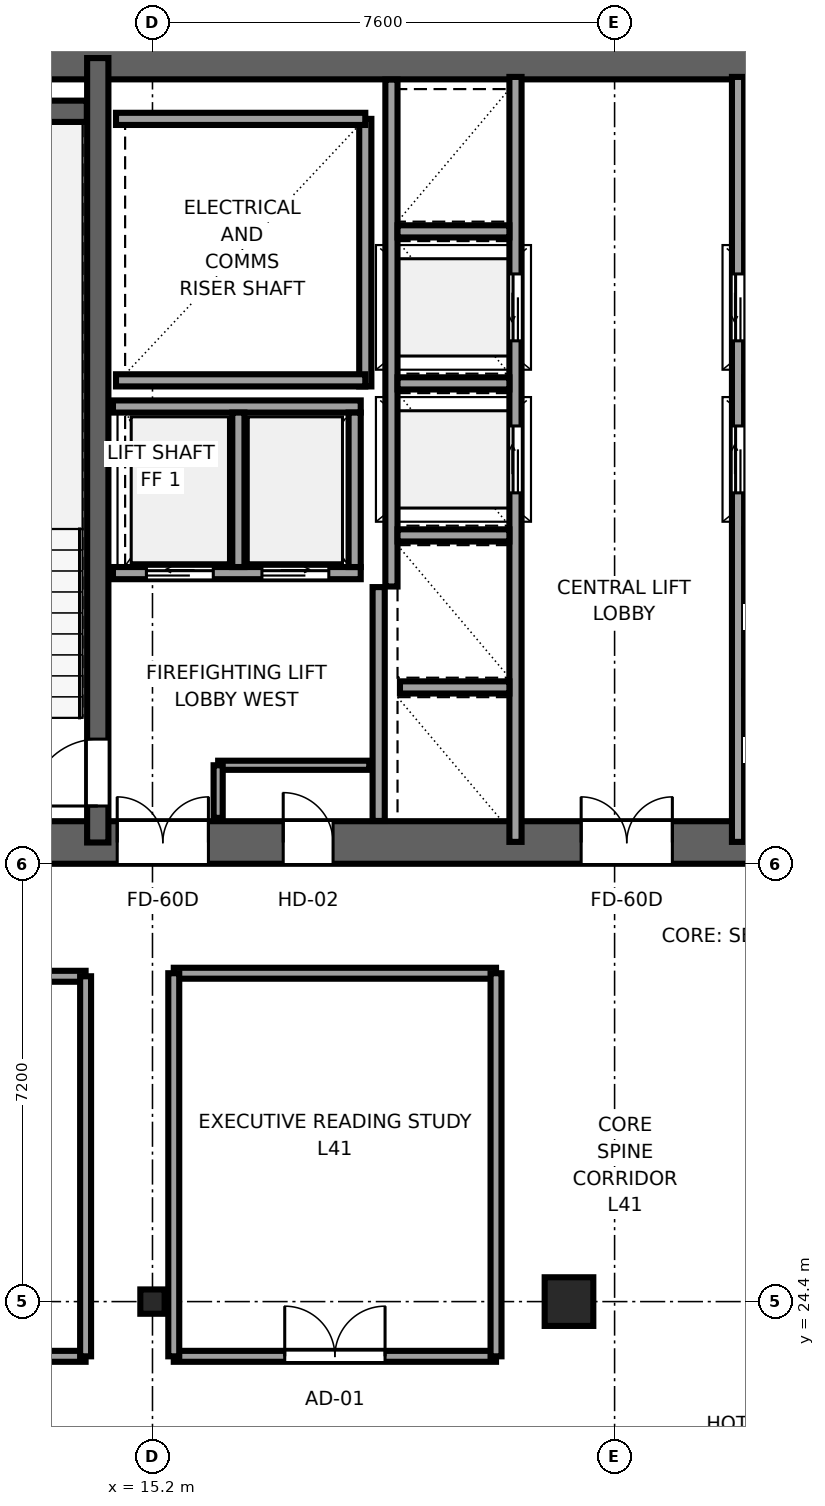
"""IFC4 building model, lengths in metres.
Left out: names, types, materials, properties, quantities, classifications, styles, units other than length and angle.
Written with IfcOpenShell. Run it as: python <this file> out.ifc"""

import sys

from ifc_helpers import new_model, si_unit, direction, frame, frame_2d, origin, origin_2d, place, context, subcontext, project, spatial, rectangle, i_section, extrude, source, transform, mapped, element, fill, save


model = new_model("IFC4")
c1 = context("Model", 3, precision=1e-05, world=origin(), true_north=direction((0.0, 1.0)))
c2 = subcontext(c1, "Body", "Model", "MODEL_VIEW")
j1 = project(units=[si_unit("LENGTHUNIT", "METRE"), si_unit("PLANEANGLEUNIT", "RADIAN")], contexts=[c1])
p1 = place(None, origin())
s1 = spatial("IfcSite", under=j1, at=p1, CompositionType="ELEMENT")
p2 = place(p1, origin())
s2 = spatial("IfcBuilding", under=s1, at=p2, CompositionType="ELEMENT")
p3 = place(p2, frame((0.0, 0.0, 157.7)))
s3 = spatial("IfcBuildingStorey", under=s2, at=p3, CompositionType="ELEMENT", Elevation=157.7)
p4 = place(p3, frame((9.8, 31.95, 0.0), z_axis=(0.0, 0.0, 1.0), x_axis=(1.0, 0.0, 0.0)))
e1 = element("IfcWall", 1, at=p4, inside=s3, PredefinedType="SHEAR", context=c2, shape_type="SweptSolid", body=[
    extrude(rectangle(XDim=26.4, YDim=0.7, at=frame_2d((13.2, 0.0))), origin(), (0.0, 0.0, 1.0), 3.55),
])
p5 = place(p4, frame((6.32, 0.0, 0.0), z_axis=(0.0, 0.0, 1.0), x_axis=(-1.0, 0.0, 0.0)))
e2 = element("IfcOpeningElement", 2, at=p5, cuts=e1, PredefinedType="OPENING", context=c2, shape_type="SweptSolid", body=[
    extrude(rectangle(XDim=1.5, YDim=2.04, at=frame_2d((0.75, 1.02))), frame((0.0, 0.36, 0.0), z_axis=(0.0, -1.0, 0.0), x_axis=(1.0, 0.0, 0.0)), (0.0, 0.0, 1.0), 0.72),
])
p6 = place(p4, frame((13.95, 0.0, 0.0), z_axis=(0.0, 0.0, 1.0), x_axis=(-1.0, 0.0, 0.0)))
e3 = element("IfcOpeningElement", 3, at=p6, cuts=e1, PredefinedType="OPENING", context=c2, shape_type="SweptSolid", body=[
    extrude(rectangle(XDim=1.5, YDim=2.04, at=frame_2d((0.75, 1.02))), frame((0.0, 0.36, 0.0), z_axis=(0.0, -1.0, 0.0), x_axis=(1.0, 0.0, 0.0)), (0.0, 0.0, 1.0), 0.72),
])
p7 = place(p4, frame((21.58, 0.0, 0.0), z_axis=(0.0, 0.0, 1.0), x_axis=(-1.0, 0.0, 0.0)))
e4 = element("IfcOpeningElement", 4, at=p7, cuts=e1, PredefinedType="OPENING", context=c2, shape_type="SweptSolid", body=[
    extrude(rectangle(XDim=1.5, YDim=2.04, at=frame_2d((0.75, 1.02))), frame((0.0, 0.36, 0.0), z_axis=(0.0, -1.0, 0.0), x_axis=(1.0, 0.0, 0.0)), (0.0, 0.0, 1.0), 0.72),
])
p8 = place(p4, frame((8.37, 0.0, 0.0), z_axis=(0.0, 0.0, 1.0), x_axis=(-1.0, 0.0, 0.0)))
e5 = element("IfcOpeningElement", 5, at=p8, cuts=e1, PredefinedType="OPENING", context=c2, shape_type="SweptSolid", body=[
    extrude(rectangle(XDim=0.82, YDim=2.01, at=frame_2d((0.41, 1.005))), frame((0.0, 0.36, 0.0), z_axis=(0.0, -1.0, 0.0), x_axis=(1.0, 0.0, 0.0)), (0.0, 0.0, 1.0), 0.72),
])
p9 = place(p4, frame((18.87, 0.0, 0.0), z_axis=(0.0, 0.0, 1.0), x_axis=(-1.0, 0.0, 0.0)))
e6 = element("IfcOpeningElement", 6, at=p9, cuts=e1, PredefinedType="OPENING", context=c2, shape_type="SweptSolid", body=[
    extrude(rectangle(XDim=0.82, YDim=2.01, at=frame_2d((0.41, 1.005))), frame((0.0, 0.36, 0.0), z_axis=(0.0, -1.0, 0.0), x_axis=(1.0, 0.0, 0.0)), (0.0, 0.0, 1.0), 0.72),
])
p10 = place(p3, frame((9.8, 44.85, 0.0), z_axis=(0.0, 0.0, 1.0), x_axis=(1.0, 0.0, 0.0)))
e7 = element("IfcWall", 7, at=p10, inside=s3, PredefinedType="SHEAR", context=c2, shape_type="SweptSolid", body=[
    extrude(rectangle(XDim=26.4, YDim=0.7, at=frame_2d((13.2, 0.0))), origin(), (0.0, 0.0, 1.0), 3.55),
])
p11 = place(p3, frame((14.3, 31.95, 0.0), z_axis=(0.0, 0.0, 1.0), x_axis=(0.0, 1.0, 0.0)))
e8 = element("IfcWall", 8, at=p11, inside=s3, PredefinedType="SHEAR", context=c2, shape_type="SweptSolid", body=[
    extrude(rectangle(XDim=12.9, YDim=0.35, at=frame_2d((6.45, 0.0))), origin(), (0.0, 0.0, 1.0), 3.55),
])
p12 = place(p11, frame((0.6, 0.0, 0.0)))
e9 = element("IfcOpeningElement", 9, at=p12, cuts=e8, PredefinedType="OPENING", context=c2, shape_type="SweptSolid", body=[
    extrude(rectangle(XDim=1.1, YDim=2.12, at=frame_2d((0.55, 1.06))), frame((0.0, 0.185, 0.0), z_axis=(0.0, -1.0, 0.0), x_axis=(1.0, 0.0, 0.0)), (0.0, 0.0, 1.0), 0.37),
])
p13 = place(p3, frame((10.52, 43.975, 0.0), z_axis=(0.0, 0.0, 1.0), x_axis=(1.0, 0.0, 0.0)))
e10 = element("IfcWall", 10, at=p13, inside=s3, PredefinedType="SHEAR", context=c2, shape_type="SweptSolid", body=[
    extrude(rectangle(XDim=3.6, YDim=0.35, at=frame_2d((1.8, 0.0))), origin(), (0.0, 0.0, 1.0), 3.55),
])
m1 = source(origin(), c2, "Body", "SweptSolid", [
    extrude(i_section(OverallWidth=0.4, OverallDepth=0.4, WebThickness=0.02, FlangeThickness=0.035, at=origin_2d()), origin(), (0.0, 0.0, 1.0), 3.55),
])
p14 = place(p3, frame((15.2, 24.4, 0.0), z_axis=(0.0, 0.0, 1.0), x_axis=(1.0, 0.0, 0.0)))
e11 = element("IfcColumn", 11, at=p14, inside=s3, PredefinedType="COLUMN", context=c2, shape_type="MappedRepresentation", body=[
    mapped(m1, transform((0.0, 0.0, 0.0), x_axis=(1.0, 0.0, 0.0), y_axis=(0.0, 1.0, 0.0), z_axis=(0.0, 0.0, 1.0), scale=1.0)),
])
m2 = source(origin(), c2, "Body", "SweptSolid", [
    extrude(rectangle(XDim=0.8, YDim=0.8, at=origin_2d()), origin(), (0.0, 0.0, 1.0), 3.55),
])
p15 = place(p3, frame((22.05, 24.4, 0.0), z_axis=(0.0, 0.0, 1.0), x_axis=(1.0, 0.0, 0.0)))
e12 = element("IfcColumn", 12, at=p15, inside=s3, PredefinedType="COLUMN", context=c2, shape_type="MappedRepresentation", body=[
    mapped(m2, transform((0.0, 0.0, 0.0), x_axis=(1.0, 0.0, 0.0), y_axis=(0.0, 1.0, 0.0), z_axis=(0.0, 0.0, 1.0), scale=1.0)),
])
p16 = place(p3, frame((18.7, 39.45, 0.0), z_axis=(0.0, 0.0, 1.0), x_axis=(0.0, 1.0, 0.0)))
e13 = element("IfcWall", 13, at=p16, inside=s3, PredefinedType="SOLIDWALL", context=c2, shape_type="SweptSolid", body=[
    extrude(rectangle(XDim=4.4, YDim=0.2, at=frame_2d((2.2, 0.0))), origin(), (0.0, 0.0, 1.0), 3.37),
])
for number, where, z_axis, x_axis in (
    (14, (14.6, 39.55, 0.0), (0.0, 0.0, 1.0), (1.0, 0.0, 0.0)),
    (15, (14.6, 43.85, 0.0), (0.0, 0.0, 1.0), (1.0, 0.0, 0.0)),
):
    element("IfcWall", number, at=place(p3, frame(where, z_axis=z_axis, x_axis=x_axis)), inside=s3, PredefinedType="SOLIDWALL", context=c2, shape_type="SweptSolid", body=[
        extrude(rectangle(XDim=4.1, YDim=0.2, at=frame_2d((2.05, 0.0))), origin(), (0.0, 0.0, 1.0), 3.37),
    ])
p17 = place(p3, frame((18.92, 32.304, 0.0), z_axis=(0.0, 0.0, 1.0), x_axis=(0.0, 1.0, 0.0)))
e16 = element("IfcWall", 16, at=p17, inside=s3, PredefinedType="SOLIDWALL", context=c2, shape_type="SweptSolid", body=[
    extrude(rectangle(XDim=3.846, YDim=0.2, at=frame_2d((1.923, 0.0))), origin(), (0.0, 0.0, 1.0), 3.37),
])
p18 = place(p3, frame((21.17, 31.96, 0.0), z_axis=(0.0, 0.0, 1.0), x_axis=(0.0, 1.0, 0.0)))
e17 = element("IfcWall", 17, at=p18, inside=s3, PredefinedType="SOLIDWALL", context=c2, shape_type="SweptSolid", body=[
    extrude(rectangle(XDim=12.58, YDim=0.2, at=frame_2d((6.29, 0.0))), origin(), (0.0, 0.0, 1.0), 3.37),
])
p19 = place(p18, frame((5.74, 0.0, 0.0)))
e18 = element("IfcOpeningElement", 18, at=p19, cuts=e17, PredefinedType="OPENING", context=c2, shape_type="SweptSolid", body=[
    extrude(rectangle(XDim=1.1, YDim=2.12, at=frame_2d((0.55, 1.06))), frame((0.0, 0.11, 0.0), z_axis=(0.0, -1.0, 0.0), x_axis=(1.0, 0.0, 0.0)), (0.0, 0.0, 1.0), 0.22),
])
p20 = place(p18, frame((8.24, 0.0, 0.0)))
e19 = element("IfcOpeningElement", 19, at=p20, cuts=e17, PredefinedType="OPENING", context=c2, shape_type="SweptSolid", body=[
    extrude(rectangle(XDim=1.1, YDim=2.12, at=frame_2d((0.55, 1.06))), frame((0.0, 0.11, 0.0), z_axis=(0.0, -1.0, 0.0), x_axis=(1.0, 0.0, 0.0)), (0.0, 0.0, 1.0), 0.22),
])
p21 = place(p3, frame((19.13, 36.16, 0.0), z_axis=(0.0, 0.0, 1.0), x_axis=(0.0, 1.0, 0.0)))
e20 = element("IfcWall", 20, at=p21, inside=s3, PredefinedType="SOLIDWALL", context=c2, shape_type="SweptSolid", body=[
    extrude(rectangle(XDim=8.336, YDim=0.2, at=frame_2d((4.168, 0.0))), origin(), (0.0, 0.0, 1.0), 3.37),
])
p22 = place(p3, frame((19.27, 34.5, 0.0), z_axis=(0.0, 0.0, 1.0), x_axis=(1.0, 0.0, 0.0)))
e21 = element("IfcWall", 21, at=p22, inside=s3, PredefinedType="SOLIDWALL", context=c2, shape_type="SweptSolid", body=[
    extrude(rectangle(XDim=1.8, YDim=0.2, at=frame_2d((0.9, 0.0))), origin(), (0.0, 0.0, 1.0), 3.37),
])
for number, where, z_axis, x_axis in (
    (22, (19.23, 37.0, 0.0), (0.0, 0.0, 1.0), (1.0, 0.0, 0.0)),
    (23, (19.23, 39.5, 0.0), (0.0, 0.0, 1.0), (1.0, 0.0, 0.0)),
    (24, (19.23, 42.0, 0.0), (0.0, 0.0, 1.0), (1.0, 0.0, 0.0)),
):
    element("IfcWall", number, at=place(p3, frame(where, z_axis=z_axis, x_axis=x_axis)), inside=s3, PredefinedType="SOLIDWALL", context=c2, shape_type="SweptSolid", body=[
        extrude(rectangle(XDim=1.84, YDim=0.2, at=frame_2d((0.92, 0.0))), origin(), (0.0, 0.0, 1.0), 3.37),
    ])
p23 = place(p3, frame((14.55, 36.38, 0.0), z_axis=(0.0, 0.0, 1.0), x_axis=(1.0, 0.0, 0.0)))
e25 = element("IfcWall", 25, at=p23, inside=s3, PredefinedType="SOLIDWALL", context=c2, shape_type="SweptSolid", body=[
    extrude(rectangle(XDim=4.075, YDim=0.2, at=frame_2d((2.038, 0.0))), origin(), (0.0, 0.0, 1.0), 3.37),
])
p24 = place(p23, frame((0.55, 0.0, 0.0)))
e26 = element("IfcOpeningElement", 26, at=p24, cuts=e25, PredefinedType="OPENING", context=c2, shape_type="SweptSolid", body=[
    extrude(rectangle(XDim=1.1, YDim=2.12, at=frame_2d((0.55, 1.06))), frame((0.0, 0.11, 0.0), z_axis=(0.0, -1.0, 0.0), x_axis=(1.0, 0.0, 0.0)), (0.0, 0.0, 1.0), 0.22),
])
p25 = place(p23, frame((2.45, 0.0, 0.0)))
e27 = element("IfcOpeningElement", 27, at=p25, cuts=e25, PredefinedType="OPENING", context=c2, shape_type="SweptSolid", body=[
    extrude(rectangle(XDim=1.1, YDim=2.12, at=frame_2d((0.55, 1.06))), frame((0.0, 0.11, 0.0), z_axis=(0.0, -1.0, 0.0), x_axis=(1.0, 0.0, 0.0)), (0.0, 0.0, 1.0), 0.22),
])
p26 = place(p3, frame((14.55, 39.12, 0.0), z_axis=(0.0, 0.0, 1.0), x_axis=(1.0, 0.0, 0.0)))
e28 = element("IfcWall", 28, at=p26, inside=s3, PredefinedType="SOLIDWALL", context=c2, shape_type="SweptSolid", body=[
    extrude(rectangle(XDim=4.075, YDim=0.2, at=frame_2d((2.038, 0.0))), origin(), (0.0, 0.0, 1.0), 3.37),
])
for number, where, z_axis, x_axis in (
    (29, (18.525, 36.48, 0.0), (0.0, 0.0, 1.0), (0.0, 1.0, 0.0)),
    (30, (16.613, 36.48, 0.0), (0.0, 0.0, 1.0), (0.0, 1.0, 0.0)),
):
    element("IfcWall", number, at=place(p3, frame(where, z_axis=z_axis, x_axis=x_axis)), inside=s3, PredefinedType="SOLIDWALL", context=c2, shape_type="SweptSolid", body=[
        extrude(rectangle(XDim=2.54, YDim=0.2, at=frame_2d((1.27, 0.0))), origin(), (0.0, 0.0, 1.0), 3.37),
    ])
p27 = place(p3, frame((24.83, 31.96, 0.0), z_axis=(0.0, 0.0, 1.0), x_axis=(0.0, 1.0, 0.0)))
e31 = element("IfcWall", 31, at=p27, inside=s3, PredefinedType="SOLIDWALL", context=c2, shape_type="SweptSolid", body=[
    extrude(rectangle(XDim=12.58, YDim=0.2, at=frame_2d((6.29, 0.0))), origin(), (0.0, 0.0, 1.0), 3.37),
])
p28 = place(p27, frame((5.74, 0.0, 0.0)))
e32 = element("IfcOpeningElement", 32, at=p28, cuts=e31, PredefinedType="OPENING", context=c2, shape_type="SweptSolid", body=[
    extrude(rectangle(XDim=1.1, YDim=2.12, at=frame_2d((0.55, 1.06))), frame((0.0, 0.11, 0.0), z_axis=(0.0, -1.0, 0.0), x_axis=(1.0, 0.0, 0.0)), (0.0, 0.0, 1.0), 0.22),
])
p29 = place(p27, frame((8.24, 0.0, 0.0)))
e33 = element("IfcOpeningElement", 33, at=p29, cuts=e31, PredefinedType="OPENING", context=c2, shape_type="SweptSolid", body=[
    extrude(rectangle(XDim=1.1, YDim=2.12, at=frame_2d((0.55, 1.06))), frame((0.0, 0.11, 0.0), z_axis=(0.0, -1.0, 0.0), x_axis=(1.0, 0.0, 0.0)), (0.0, 0.0, 1.0), 0.22),
])
p30 = place(p3, frame((24.93, 34.5, 0.0), z_axis=(0.0, 0.0, 1.0), x_axis=(1.0, 0.0, 0.0)))
e34 = element("IfcWall", 34, at=p30, inside=s3, PredefinedType="SOLIDWALL", context=c2, shape_type="SweptSolid", body=[
    extrude(rectangle(XDim=1.8, YDim=0.2, at=frame_2d((0.9, 0.0))), origin(), (0.0, 0.0, 1.0), 3.37),
])
for number, where, z_axis, x_axis in (
    (35, (24.93, 37.0, 0.0), (0.0, 0.0, 1.0), (1.0, 0.0, 0.0)),
    (36, (24.93, 39.5, 0.0), (0.0, 0.0, 1.0), (1.0, 0.0, 0.0)),
    (37, (24.93, 42.0, 0.0), (0.0, 0.0, 1.0), (1.0, 0.0, 0.0)),
):
    element("IfcWall", number, at=place(p3, frame(where, z_axis=z_axis, x_axis=x_axis)), inside=s3, PredefinedType="SOLIDWALL", context=c2, shape_type="SweptSolid", body=[
        extrude(rectangle(XDim=1.84, YDim=0.2, at=frame_2d((0.92, 0.0))), origin(), (0.0, 0.0, 1.0), 3.37),
    ])
p31 = place(p3, frame((16.28, 33.22, 0.0), z_axis=(0.0, 0.0, 1.0), x_axis=(1.0, 0.0, 0.0)))
e38 = element("IfcWall", 38, at=p31, inside=s3, PredefinedType="PARTITIONING", context=c2, shape_type="SweptSolid", body=[
    extrude(rectangle(XDim=2.485, YDim=0.15, at=frame_2d((1.242, 0.0))), origin(), (0.0, 0.0, 1.0), 3.37),
])
p32 = place(p3, frame((16.28, 32.355, 0.0), z_axis=(0.0, 0.0, 1.0), x_axis=(0.0, 1.0, 0.0)))
e39 = element("IfcWall", 39, at=p32, inside=s3, PredefinedType="PARTITIONING", context=c2, shape_type="SweptSolid", body=[
    extrude(rectangle(XDim=0.865, YDim=0.15, at=frame_2d((0.433, 0.0))), origin(), (0.0, 0.0, 1.0), 3.37),
])
p33 = place(p3, frame((9.88, 23.5, 0.0), z_axis=(0.0, 0.0, 1.0), x_axis=(1.0, 0.0, 0.0)))
e40 = element("IfcWall", 40, at=p33, inside=s3, PredefinedType="PARTITIONING", context=c2, shape_type="SweptSolid", body=[
    extrude(rectangle(XDim=4.22, YDim=0.18, at=frame_2d((2.11, 0.0))), origin(), (0.0, 0.0, 1.0), 3.37),
])
p34 = place(p33, frame((1.285, 0.0, 0.0)))
e41 = element("IfcOpeningElement", 41, at=p34, cuts=e40, PredefinedType="OPENING", context=c2, shape_type="SweptSolid", body=[
    extrude(rectangle(XDim=1.65, YDim=2.15, at=frame_2d((0.825, 1.075))), frame((0.0, 0.1, 0.0), z_axis=(0.0, -1.0, 0.0), x_axis=(1.0, 0.0, 0.0)), (0.0, 0.0, 1.0), 0.2),
])
p35 = place(p3, frame((9.88, 29.75, 0.0), z_axis=(0.0, 0.0, 1.0), x_axis=(1.0, 0.0, 0.0)))
e42 = element("IfcWall", 42, at=p35, inside=s3, PredefinedType="PARTITIONING", context=c2, shape_type="SweptSolid", body=[
    extrude(rectangle(XDim=4.22, YDim=0.18, at=frame_2d((2.11, 0.0))), origin(), (0.0, 0.0, 1.0), 3.37),
])
p36 = place(p3, frame((14.1, 23.5, 0.0), z_axis=(0.0, 0.0, 1.0), x_axis=(0.0, 1.0, 0.0)))
e43 = element("IfcWall", 43, at=p36, inside=s3, PredefinedType="PARTITIONING", context=c2, shape_type="SweptSolid", body=[
    extrude(rectangle(XDim=6.25, YDim=0.18, at=frame_2d((3.125, 0.0))), origin(), (0.0, 0.0, 1.0), 3.37),
])
p37 = place(p3, frame((15.55, 23.5, 0.0), z_axis=(0.0, 0.0, 1.0), x_axis=(1.0, 0.0, 0.0)))
e44 = element("IfcWall", 44, at=p37, inside=s3, PredefinedType="PARTITIONING", context=c2, shape_type="SweptSolid", body=[
    extrude(rectangle(XDim=5.3, YDim=0.18, at=frame_2d((2.65, 0.0))), origin(), (0.0, 0.0, 1.0), 3.37),
])
p38 = place(p37, frame((1.825, 0.0, 0.0)))
e45 = element("IfcOpeningElement", 45, at=p38, cuts=e44, PredefinedType="OPENING", context=c2, shape_type="SweptSolid", body=[
    extrude(rectangle(XDim=1.65, YDim=2.15, at=frame_2d((0.825, 1.075))), frame((0.0, 0.1, 0.0), z_axis=(0.0, -1.0, 0.0), x_axis=(1.0, 0.0, 0.0)), (0.0, 0.0, 1.0), 0.2),
])
p39 = place(p3, frame((15.55, 29.8, 0.0), z_axis=(0.0, 0.0, 1.0), x_axis=(1.0, 0.0, 0.0)))
e46 = element("IfcWall", 46, at=p39, inside=s3, PredefinedType="PARTITIONING", context=c2, shape_type="SweptSolid", body=[
    extrude(rectangle(XDim=5.3, YDim=0.18, at=frame_2d((2.65, 0.0))), origin(), (0.0, 0.0, 1.0), 3.37),
])
for number, where, z_axis, x_axis in (
    (47, (15.55, 23.5, 0.0), (0.0, 0.0, 1.0), (0.0, 1.0, 0.0)),
    (48, (20.85, 23.5, 0.0), (0.0, 0.0, 1.0), (0.0, 1.0, 0.0)),
):
    element("IfcWall", number, at=place(p3, frame(where, z_axis=z_axis, x_axis=x_axis)), inside=s3, PredefinedType="PARTITIONING", context=c2, shape_type="SweptSolid", body=[
        extrude(rectangle(XDim=6.3, YDim=0.18, at=frame_2d((3.15, 0.0))), origin(), (0.0, 0.0, 1.0), 3.37),
    ])
m3 = source(origin(), c2, "Body", "SweptSolid", [
    extrude(rectangle(XDim=1.1, YDim=2.12, at=frame_2d((0.55, 1.06))), frame((0.0, 0.025, 0.0), z_axis=(0.0, -1.0, 0.0), x_axis=(1.0, 0.0, 0.0)), (0.0, 0.0, 1.0), 0.05),
])
p40 = place(p12, origin())
e49 = element("IfcDoor", 49, at=p40, inside=s3, OperationType="SINGLE_SWING_LEFT", PredefinedType="DOOR", context=c2, shape_type="MappedRepresentation", body=[
    mapped(m3, transform((0.0, 0.0, 0.0), x_axis=(1.0, 0.0, 0.0), y_axis=(0.0, 1.0, 0.0), z_axis=(0.0, 0.0, 1.0), scale=1.0)),
])
fill(e9, e49)
m4 = source(origin(), c2, "Body", "SweptSolid", [
    extrude(rectangle(XDim=1.5, YDim=2.04, at=frame_2d((0.75, 1.02))), frame((0.0, 0.025, 0.0), z_axis=(0.0, -1.0, 0.0), x_axis=(1.0, 0.0, 0.0)), (0.0, 0.0, 1.0), 0.05),
])
p41 = place(p5, origin())
e50 = element("IfcDoor", 50, at=p41, inside=s3, OperationType="DOUBLE_DOOR_SINGLE_SWING", PredefinedType="DOOR", context=c2, shape_type="MappedRepresentation", body=[
    mapped(m4, transform((0.0, 0.0, 0.0), x_axis=(1.0, 0.0, 0.0), y_axis=(0.0, 1.0, 0.0), z_axis=(0.0, 0.0, 1.0), scale=1.0)),
])
fill(e2, e50)
p42 = place(p6, origin())
e51 = element("IfcDoor", 51, at=p42, inside=s3, OperationType="DOUBLE_DOOR_SINGLE_SWING", PredefinedType="DOOR", context=c2, shape_type="MappedRepresentation", body=[
    mapped(m4, transform((0.0, 0.0, 0.0), x_axis=(1.0, 0.0, 0.0), y_axis=(0.0, 1.0, 0.0), z_axis=(0.0, 0.0, 1.0), scale=1.0)),
])
fill(e3, e51)
m5 = source(origin(), c2, "Body", "SweptSolid", [
    extrude(rectangle(XDim=0.82, YDim=2.01, at=frame_2d((0.41, 1.005))), frame((0.0, 0.025, 0.0), z_axis=(0.0, -1.0, 0.0), x_axis=(1.0, 0.0, 0.0)), (0.0, 0.0, 1.0), 0.05),
])
p43 = place(p8, origin())
e52 = element("IfcDoor", 52, at=p43, inside=s3, OperationType="SINGLE_SWING_LEFT", PredefinedType="DOOR", context=c2, shape_type="MappedRepresentation", body=[
    mapped(m5, transform((0.0, 0.0, 0.0), x_axis=(1.0, 0.0, 0.0), y_axis=(0.0, 1.0, 0.0), z_axis=(0.0, 0.0, 1.0), scale=1.0)),
])
fill(e5, e52)
m6 = source(origin(), c2, "Body", "SweptSolid", [
    extrude(rectangle(XDim=1.1, YDim=2.12, at=frame_2d((0.55, 1.06))), frame((0.0, 0.025, 0.0), z_axis=(0.0, -1.0, 0.0), x_axis=(1.0, 0.0, 0.0)), (0.0, 0.0, 1.0), 0.05),
])
p44 = place(p19, origin())
e53 = element("IfcDoor", 53, at=p44, inside=s3, OperationType="SLIDING_TO_RIGHT", PredefinedType="DOOR", context=c2, shape_type="MappedRepresentation", body=[
    mapped(m6, transform((0.0, 0.0, 0.0), x_axis=(1.0, 0.0, 0.0), y_axis=(0.0, 1.0, 0.0), z_axis=(0.0, 0.0, 1.0), scale=1.0)),
])
fill(e18, e53)
p45 = place(p20, origin())
e54 = element("IfcDoor", 54, at=p45, inside=s3, OperationType="SLIDING_TO_LEFT", PredefinedType="DOOR", context=c2, shape_type="MappedRepresentation", body=[
    mapped(m6, transform((0.0, 0.0, 0.0), x_axis=(1.0, 0.0, 0.0), y_axis=(0.0, 1.0, 0.0), z_axis=(0.0, 0.0, 1.0), scale=1.0)),
])
fill(e19, e54)
p46 = place(p24, origin())
e55 = element("IfcDoor", 55, at=p46, inside=s3, OperationType="SLIDING_TO_LEFT", PredefinedType="DOOR", context=c2, shape_type="MappedRepresentation", body=[
    mapped(m6, transform((0.0, 0.0, 0.0), x_axis=(1.0, 0.0, 0.0), y_axis=(0.0, 1.0, 0.0), z_axis=(0.0, 0.0, 1.0), scale=1.0)),
])
fill(e26, e55)
p47 = place(p25, origin())
e56 = element("IfcDoor", 56, at=p47, inside=s3, OperationType="SLIDING_TO_RIGHT", PredefinedType="DOOR", context=c2, shape_type="MappedRepresentation", body=[
    mapped(m6, transform((0.0, 0.0, 0.0), x_axis=(1.0, 0.0, 0.0), y_axis=(0.0, 1.0, 0.0), z_axis=(0.0, 0.0, 1.0), scale=1.0)),
])
fill(e27, e56)
p48 = place(p28, origin())
e57 = element("IfcDoor", 57, at=p48, inside=s3, OperationType="SLIDING_TO_RIGHT", PredefinedType="DOOR", context=c2, shape_type="MappedRepresentation", body=[
    mapped(m6, transform((0.0, 0.0, 0.0), x_axis=(1.0, 0.0, 0.0), y_axis=(0.0, 1.0, 0.0), z_axis=(0.0, 0.0, 1.0), scale=1.0)),
])
fill(e32, e57)
p49 = place(p29, origin())
e58 = element("IfcDoor", 58, at=p49, inside=s3, OperationType="SLIDING_TO_LEFT", PredefinedType="DOOR", context=c2, shape_type="MappedRepresentation", body=[
    mapped(m6, transform((0.0, 0.0, 0.0), x_axis=(1.0, 0.0, 0.0), y_axis=(0.0, 1.0, 0.0), z_axis=(0.0, 0.0, 1.0), scale=1.0)),
])
fill(e33, e58)
m7 = source(origin(), c2, "Body", "SweptSolid", [
    extrude(rectangle(XDim=1.65, YDim=2.15, at=frame_2d((0.825, 1.075))), frame((0.0, 0.025, 0.0), z_axis=(0.0, -1.0, 0.0), x_axis=(1.0, 0.0, 0.0)), (0.0, 0.0, 1.0), 0.05),
])
p50 = place(p38, origin())
e59 = element("IfcDoor", 59, at=p50, inside=s3, OperationType="DOUBLE_DOOR_SINGLE_SWING", PredefinedType="DOOR", context=c2, shape_type="MappedRepresentation", body=[
    mapped(m7, transform((0.0, 0.0, 0.0), x_axis=(1.0, 0.0, 0.0), y_axis=(0.0, 1.0, 0.0), z_axis=(0.0, 0.0, 1.0), scale=1.0)),
])
fill(e45, e59)
save(model, sys.argv[1])
